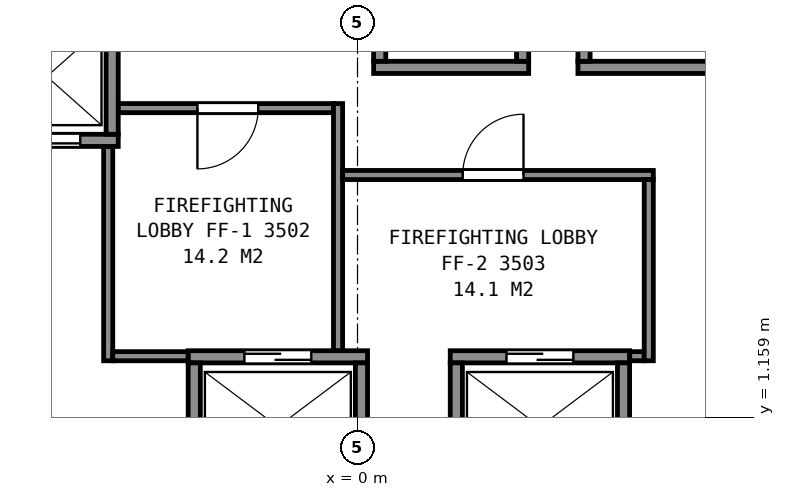
"""IFC4 building model, lengths in metres.
Left out: names, types, materials, properties, quantities, classifications, styles, units other than length and angle.
Written with IfcOpenShell. Run it as: python <this file> out.ifc"""

import sys

from ifc_helpers import new_model, si_unit, direction, frame, frame_2d, origin, place, context, subcontext, project, spatial, rectangle, extrude, element, fill, save


model = new_model("IFC4")
c1 = context("Model", 3, precision=1e-05, world=origin(), true_north=direction((0.0, 1.0)))
c2 = subcontext(c1, "Body", "Model", "MODEL_VIEW")
j1 = project(units=[si_unit("LENGTHUNIT", "METRE"), si_unit("PLANEANGLEUNIT", "RADIAN")], contexts=[c1])
p1 = place(None, origin())
s1 = spatial("IfcSite", under=j1, at=p1, CompositionType="ELEMENT")
p2 = place(p1, origin())
s2 = spatial("IfcBuilding", under=s1, at=p2, CompositionType="ELEMENT")
p3 = place(p2, frame((0.0, 0.0, 143.2)))
s3 = spatial("IfcBuildingStorey", under=s2, at=p3, CompositionType="ELEMENT", Elevation=143.2)
p4 = place(p3, frame((-2.785, 2.15, 0.0), z_axis=(0.0, 0.0, 1.0), x_axis=(1.0, 0.0, 0.0)))
e1 = element("IfcWall", 1, at=p4, inside=s3, PredefinedType="PARTITIONING", context=c2, shape_type="SweptSolid", body=[
    extrude(rectangle(XDim=2.95, YDim=0.2, at=frame_2d((1.475, 0.0))), origin(), (0.0, 0.0, 1.0), 5.6),
])
p5 = place(p4, frame((0.925, 0.0, 0.0)))
e2 = element("IfcOpeningElement", 2, at=p5, cuts=e1, PredefinedType="OPENING", context=c2, shape_type="SweptSolid", body=[
    extrude(rectangle(XDim=1.1, YDim=2.1, at=frame_2d((0.55, 1.05))), frame((0.0, 0.11, 0.0), z_axis=(0.0, -1.0, 0.0), x_axis=(1.0, 0.0, 0.0)), (0.0, 0.0, 1.0), 0.22),
])
p6 = place(p3, frame((1.525, 2.15, 0.0), z_axis=(0.0, 0.0, 1.0), x_axis=(1.0, 0.0, 0.0)))
e3 = element("IfcWall", 3, at=p6, inside=s3, PredefinedType="PARTITIONING", context=c2, shape_type="SweptSolid", body=[
    extrude(rectangle(XDim=2.95, YDim=0.2, at=frame_2d((1.475, 0.0))), origin(), (0.0, 0.0, 1.0), 5.6),
])
p7 = place(p6, frame((0.925, 0.0, 0.0)))
e4 = element("IfcOpeningElement", 4, at=p7, cuts=e3, PredefinedType="OPENING", context=c2, shape_type="SweptSolid", body=[
    extrude(rectangle(XDim=1.1, YDim=2.1, at=frame_2d((0.55, 1.05))), frame((0.0, 0.11, 0.0), z_axis=(0.0, -1.0, 0.0), x_axis=(1.0, 0.0, 0.0)), (0.0, 0.0, 1.0), 0.22),
])
p8 = place(p3, frame((-6.285, 5.71, 0.0), z_axis=(0.0, 0.0, 1.0), x_axis=(1.0, 0.0, 0.0)))
e5 = element("IfcWall", 5, at=p8, inside=s3, PredefinedType="PARTITIONING", context=c2, shape_type="SweptSolid", body=[
    extrude(rectangle(XDim=2.35, YDim=0.2, at=frame_2d((1.175, 0.0))), origin(), (0.0, 0.0, 1.0), 5.6),
])
p9 = place(p8, frame((0.625, 0.0, 0.0)))
e6 = element("IfcOpeningElement", 6, at=p9, cuts=e5, PredefinedType="OPENING", context=c2, shape_type="SweptSolid", body=[
    extrude(rectangle(XDim=1.1, YDim=2.1, at=frame_2d((0.55, 1.05))), frame((0.0, 0.11, 0.0), z_axis=(0.0, -1.0, 0.0), x_axis=(1.0, 0.0, 0.0)), (0.0, 0.0, 1.0), 0.22),
])
for number, where, z_axis, x_axis in (
    (7, (0.265, 6.91, 0.0), (0.0, 0.0, 1.0), (1.0, 0.0, 0.0)),
    (8, (3.625, 6.91, 0.0), (0.0, 0.0, 1.0), (1.0, 0.0, 0.0)),
):
    element("IfcWall", number, at=place(p3, frame(where, z_axis=z_axis, x_axis=x_axis)), inside=s3, PredefinedType="PARTITIONING", context=c2, shape_type="SweptSolid", body=[
        extrude(rectangle(XDim=2.55, YDim=0.2, at=frame_2d((1.275, 0.0))), origin(), (0.0, 0.0, 1.0), 5.35),
    ])
p10 = place(p3, frame((5.663, -1.612, 0.0), z_axis=(0.0, 0.0, 1.0), x_axis=(0.49998122708, 0.866036242063, 0.0)))
e9 = element("IfcWall", 9, at=p10, inside=s3, PredefinedType="PARTITIONING", context=c2, shape_type="SweptSolid", body=[
    extrude(rectangle(XDim=4.9, YDim=0.2, at=frame_2d((2.45, 0.0))), origin(), (0.0, 0.0, 1.0), 5.6),
])
p11 = place(p10, frame((3.075, 0.0, 0.0)))
e10 = element("IfcOpeningElement", 10, at=p11, cuts=e9, PredefinedType="OPENING", context=c2, shape_type="SweptSolid", body=[
    extrude(rectangle(XDim=1.1, YDim=2.1, at=frame_2d((0.55, 1.05))), frame((0.0, 0.11, 0.0), z_axis=(0.0, -1.0, 0.0), x_axis=(1.0, 0.0, 0.0)), (0.0, 0.0, 1.0), 0.22),
])
p12 = place(p10, frame((0.725, 0.0, 0.0)))
e11 = element("IfcOpeningElement", 11, at=p12, cuts=e9, PredefinedType="OPENING", context=c2, shape_type="SweptSolid", body=[
    extrude(rectangle(XDim=1.1, YDim=2.1, at=frame_2d((0.55, 1.05))), frame((0.0, 0.11, 0.0), z_axis=(0.0, -1.0, 0.0), x_axis=(1.0, 0.0, 0.0)), (0.0, 0.0, 1.0), 0.22),
])
p13 = place(p3, frame((4.375, 0.1, 0.0), z_axis=(0.0, 0.0, 1.0), x_axis=(0.0, 1.0, 0.0)))
e12 = element("IfcWall", 12, at=p13, inside=s3, PredefinedType="PARTITIONING", context=c2, shape_type="SweptSolid", body=[
    extrude(rectangle(XDim=1.95, YDim=0.2, at=frame_2d((0.975, 0.0))), origin(), (0.0, 0.0, 1.0), 5.6),
])
for number, where, z_axis, x_axis in (
    (13, (3.725, 7.01, 0.0), (0.0, 0.0, 1.0), (0.0, 1.0, 0.0)),
    (14, (2.715, 7.01, 0.0), (0.0, 0.0, 1.0), (0.0, 1.0, 0.0)),
):
    element("IfcWall", number, at=place(p3, frame(where, z_axis=z_axis, x_axis=x_axis)), inside=s3, PredefinedType="PARTITIONING", context=c2, shape_type="SweptSolid", body=[
        extrude(rectangle(XDim=1.75, YDim=0.2, at=frame_2d((0.875, 0.0))), origin(), (0.0, 0.0, 1.0), 4.733),
    ])
p14 = place(p3, frame((1.625, 0.1, 0.0), z_axis=(0.0, 0.0, 1.0), x_axis=(0.0, 1.0, 0.0)))
e15 = element("IfcWall", 15, at=p14, inside=s3, PredefinedType="PARTITIONING", context=c2, shape_type="SweptSolid", body=[
    extrude(rectangle(XDim=1.95, YDim=0.2, at=frame_2d((0.975, 0.0))), origin(), (0.0, 0.0, 1.0), 5.6),
])
p15 = place(p3, frame((0.365, 7.01, 0.0), z_axis=(0.0, 0.0, 1.0), x_axis=(0.0, 1.0, 0.0)))
e16 = element("IfcWall", 16, at=p15, inside=s3, PredefinedType="PARTITIONING", context=c2, shape_type="SweptSolid", body=[
    extrude(rectangle(XDim=1.75, YDim=0.2, at=frame_2d((0.875, 0.0))), origin(), (0.0, 0.0, 1.0), 4.733),
])
for number, where, z_axis, x_axis in (
    (17, (0.065, 0.1, 0.0), (0.0, 0.0, 1.0), (0.0, 1.0, 0.0)),
    (18, (-2.685, 0.1, 0.0), (0.0, 0.0, 1.0), (0.0, 1.0, 0.0)),
):
    element("IfcWall", number, at=place(p3, frame(where, z_axis=z_axis, x_axis=x_axis)), inside=s3, PredefinedType="PARTITIONING", context=c2, shape_type="SweptSolid", body=[
        extrude(rectangle(XDim=1.95, YDim=0.2, at=frame_2d((0.975, 0.0))), origin(), (0.0, 0.0, 1.0), 5.6),
    ])
p16 = place(p3, frame((-4.035, 5.81, 0.0), z_axis=(0.0, 0.0, 1.0), x_axis=(0.0, 1.0, 0.0)))
e19 = element("IfcWall", 19, at=p16, inside=s3, PredefinedType="PARTITIONING", context=c2, shape_type="SweptSolid", body=[
    extrude(rectangle(XDim=1.75, YDim=0.2, at=frame_2d((0.875, 0.0))), origin(), (0.0, 0.0, 1.0), 5.6),
])
p17 = place(p3, frame((-4.1, 2.085, 0.0), z_axis=(0.0, 0.0, 1.0), x_axis=(0.0, 1.0, 0.0)))
e20 = element("IfcWall", 20, at=p17, inside=s3, PredefinedType="PARTITIONING", context=c2, shape_type="SweptSolid", body=[
    extrude(rectangle(XDim=3.523, YDim=0.15, at=frame_2d((1.761, 0.0))), origin(), (0.0, 0.0, 1.0), 5.35),
])
p18 = place(p3, frame((-4.025, 2.16, 0.0), z_axis=(0.0, 0.0, 1.0), x_axis=(1.0, 0.0, 0.0)))
e21 = element("IfcWall", 21, at=p18, inside=s3, PredefinedType="PARTITIONING", context=c2, shape_type="SweptSolid", body=[
    extrude(rectangle(XDim=1.238, YDim=0.15, at=frame_2d((0.619, 0.0))), origin(), (0.0, 0.0, 1.0), 5.35),
])
p19 = place(p3, frame((-3.933, 6.24, 0.0), z_axis=(0.0, 0.0, 1.0), x_axis=(1.0, 0.0, 0.0)))
e22 = element("IfcWall", 22, at=p19, inside=s3, PredefinedType="PARTITIONING", context=c2, shape_type="SweptSolid", body=[
    extrude(rectangle(XDim=3.538, YDim=0.15, at=frame_2d((1.769, 0.0))), origin(), (0.0, 0.0, 1.0), 5.35),
])
p20 = place(p19, frame((1.3, 0.0, 0.0)))
e23 = element("IfcOpeningElement", 23, at=p20, cuts=e22, PredefinedType="OPENING", context=c2, shape_type="SweptSolid", body=[
    extrude(rectangle(XDim=1.0, YDim=2.1, at=frame_2d((0.5, 1.05))), frame((0.0, 0.085, 0.0), z_axis=(0.0, -1.0, 0.0), x_axis=(1.0, 0.0, 0.0)), (0.0, 0.0, 1.0), 0.17),
])
p21 = place(p3, frame((-0.32, 2.252, 0.0), z_axis=(0.0, 0.0, 1.0), x_axis=(0.0, 1.0, 0.0)))
e24 = element("IfcWall", 24, at=p21, inside=s3, PredefinedType="PARTITIONING", context=c2, shape_type="SweptSolid", body=[
    extrude(rectangle(XDim=4.063, YDim=0.15, at=frame_2d((2.031, 0.0))), origin(), (0.0, 0.0, 1.0), 5.35),
])
p22 = place(p3, frame((-0.245, 5.14, 0.0), z_axis=(0.0, 0.0, 1.0), x_axis=(1.0, 0.0, 0.0)))
e25 = element("IfcWall", 25, at=p22, inside=s3, PredefinedType="PARTITIONING", context=c2, shape_type="SweptSolid", body=[
    extrude(rectangle(XDim=5.11, YDim=0.15, at=frame_2d((2.555, 0.0))), origin(), (0.0, 0.0, 1.0), 5.35),
])
p23 = place(p22, frame((1.975, 0.0, 0.0)))
e26 = element("IfcOpeningElement", 26, at=p23, cuts=e25, PredefinedType="OPENING", context=c2, shape_type="SweptSolid", body=[
    extrude(rectangle(XDim=1.0, YDim=2.1, at=frame_2d((0.5, 1.05))), frame((0.0, 0.085, 0.0), z_axis=(0.0, -1.0, 0.0), x_axis=(1.0, 0.0, 0.0)), (0.0, 0.0, 1.0), 0.17),
])
p24 = place(p3, frame((4.477, 2.16, 0.0), z_axis=(0.0, 0.0, 1.0), x_axis=(1.0, 0.0, 0.0)))
e27 = element("IfcWall", 27, at=p24, inside=s3, PredefinedType="PARTITIONING", context=c2, shape_type="SweptSolid", body=[
    extrude(rectangle(XDim=0.238, YDim=0.15, at=frame_2d((0.119, 0.0))), origin(), (0.0, 0.0, 1.0), 5.35),
])
p25 = place(p3, frame((4.79, 2.085, 0.0), z_axis=(0.0, 0.0, 1.0), x_axis=(0.0, 1.0, 0.0)))
e28 = element("IfcWall", 28, at=p25, inside=s3, PredefinedType="PARTITIONING", context=c2, shape_type="SweptSolid", body=[
    extrude(rectangle(XDim=2.98, YDim=0.15, at=frame_2d((1.49, 0.0))), origin(), (0.0, 0.0, 1.0), 5.35),
])
p26 = place(p3, frame((-3.756, -15.494, 0.0), z_axis=(0.0, 0.0, 1.0), x_axis=(-0.500027787016, 0.866009360349, 0.0)))
e29 = element("IfcWall", 29, at=p26, inside=s3, PredefinedType="PARTITIONING", context=c2, shape_type="SweptSolid", body=[
    extrude(rectangle(XDim=23.856, YDim=0.125, at=frame_2d((11.928, 0.0))), origin(), (0.0, 0.0, 1.0), 4.262),
])
p27 = place(p26, frame((20.393, 0.0, 0.0)))
e30 = element("IfcOpeningElement", 30, at=p27, cuts=e29, PredefinedType="OPENING", context=c2, shape_type="SweptSolid", body=[
    extrude(rectangle(XDim=1.5, YDim=2.1, at=frame_2d((0.75, 1.05))), frame((0.0, 0.073, 0.0), z_axis=(0.0, -1.0, 0.0), x_axis=(1.0, 0.0, 0.0)), (0.0, 0.0, 1.0), 0.145),
])
p28 = place(p26, frame((10.785, 0.0, 0.0)))
e31 = element("IfcOpeningElement", 31, at=p28, cuts=e29, PredefinedType="OPENING", context=c2, shape_type="SweptSolid", body=[
    extrude(rectangle(XDim=1.5, YDim=2.1, at=frame_2d((0.75, 1.05))), frame((0.0, 0.073, 0.0), z_axis=(0.0, -1.0, 0.0), x_axis=(1.0, 0.0, 0.0)), (0.0, 0.0, 1.0), 0.145),
])
p29 = place(p26, frame((1.545, 0.0, 0.0)))
e32 = element("IfcOpeningElement", 32, at=p29, cuts=e29, PredefinedType="OPENING", context=c2, shape_type="SweptSolid", body=[
    extrude(rectangle(XDim=1.5, YDim=2.1, at=frame_2d((0.75, 1.05))), frame((0.0, 0.073, 0.0), z_axis=(0.0, -1.0, 0.0), x_axis=(1.0, 0.0, 0.0)), (0.0, 0.0, 1.0), 0.145),
])
p30 = place(p3, frame((15.684, 5.165, 0.0), z_axis=(0.0, 0.0, 1.0), x_axis=(-0.500027787016, -0.866009360349, 0.0)))
e33 = element("IfcWall", 33, at=p30, inside=s3, PredefinedType="PARTITIONING", context=c2, shape_type="SweptSolid", body=[
    extrude(rectangle(XDim=23.856, YDim=0.125, at=frame_2d((11.928, 0.0))), origin(), (0.0, 0.0, 1.0), 4.262),
])
p31 = place(p30, frame((20.443, 0.0, 0.0)))
e34 = element("IfcOpeningElement", 34, at=p31, cuts=e33, PredefinedType="OPENING", context=c2, shape_type="SweptSolid", body=[
    extrude(rectangle(XDim=1.5, YDim=2.1, at=frame_2d((0.75, 1.05))), frame((0.0, 0.073, 0.0), z_axis=(0.0, -1.0, 0.0), x_axis=(1.0, 0.0, 0.0)), (0.0, 0.0, 1.0), 0.145),
])
p32 = place(p30, frame((11.56, 0.0, 0.0)))
e35 = element("IfcOpeningElement", 35, at=p32, cuts=e33, PredefinedType="OPENING", context=c2, shape_type="SweptSolid", body=[
    extrude(rectangle(XDim=1.5, YDim=2.1, at=frame_2d((0.75, 1.05))), frame((0.0, 0.073, 0.0), z_axis=(0.0, -1.0, 0.0), x_axis=(1.0, 0.0, 0.0)), (0.0, 0.0, 1.0), 0.145),
])
p33 = place(p30, frame((2.27, 0.0, 0.0)))
e36 = element("IfcOpeningElement", 36, at=p33, cuts=e33, PredefinedType="OPENING", context=c2, shape_type="SweptSolid", body=[
    extrude(rectangle(XDim=1.5, YDim=2.1, at=frame_2d((0.75, 1.05))), frame((0.0, 0.073, 0.0), z_axis=(0.0, -1.0, 0.0), x_axis=(1.0, 0.0, 0.0)), (0.0, 0.0, 1.0), 0.145),
])
p34 = place(p9, origin())
e37 = element("IfcDoor", 37, at=p34, inside=s3, OperationType="SLIDING_TO_RIGHT", PredefinedType="DOOR", context=c2, shape_type="SweptSolid", body=[
    extrude(rectangle(XDim=1.1, YDim=2.1, at=frame_2d((0.55, 1.05))), frame((0.0, 0.025, 0.0), z_axis=(0.0, -1.0, 0.0), x_axis=(1.0, 0.0, 0.0)), (0.0, 0.0, 1.0), 0.05),
])
fill(e6, e37)
p35 = place(p5, origin())
e38 = element("IfcDoor", 38, at=p35, inside=s3, OperationType="SLIDING_TO_LEFT", PredefinedType="DOOR", context=c2, shape_type="SweptSolid", body=[
    extrude(rectangle(XDim=1.1, YDim=2.1, at=frame_2d((0.55, 1.05))), frame((0.0, 0.025, 0.0), z_axis=(0.0, -1.0, 0.0), x_axis=(1.0, 0.0, 0.0)), (0.0, 0.0, 1.0), 0.05),
])
fill(e2, e38)
p36 = place(p7, origin())
e39 = element("IfcDoor", 39, at=p36, inside=s3, OperationType="SLIDING_TO_RIGHT", PredefinedType="DOOR", context=c2, shape_type="SweptSolid", body=[
    extrude(rectangle(XDim=1.1, YDim=2.1, at=frame_2d((0.55, 1.05))), frame((0.0, 0.025, 0.0), z_axis=(0.0, -1.0, 0.0), x_axis=(1.0, 0.0, 0.0)), (0.0, 0.0, 1.0), 0.05),
])
fill(e4, e39)
p37 = place(p20, origin())
e40 = element("IfcDoor", 40, at=p37, inside=s3, OperationType="SINGLE_SWING_LEFT", PredefinedType="DOOR", context=c2, shape_type="SweptSolid", body=[
    extrude(rectangle(XDim=1.0, YDim=2.1, at=frame_2d((0.5, 1.05))), frame((0.0, 0.025, 0.0), z_axis=(0.0, -1.0, 0.0), x_axis=(1.0, 0.0, 0.0)), (0.0, 0.0, 1.0), 0.05),
])
fill(e23, e40)
p38 = place(p23, origin())
e41 = element("IfcDoor", 41, at=p38, inside=s3, OperationType="SINGLE_SWING_RIGHT", PredefinedType="DOOR", context=c2, shape_type="SweptSolid", body=[
    extrude(rectangle(XDim=1.0, YDim=2.1, at=frame_2d((0.5, 1.05))), frame((0.0, 0.025, 0.0), z_axis=(0.0, -1.0, 0.0), x_axis=(1.0, 0.0, 0.0)), (0.0, 0.0, 1.0), 0.05),
])
fill(e26, e41)
save(model, sys.argv[1])
